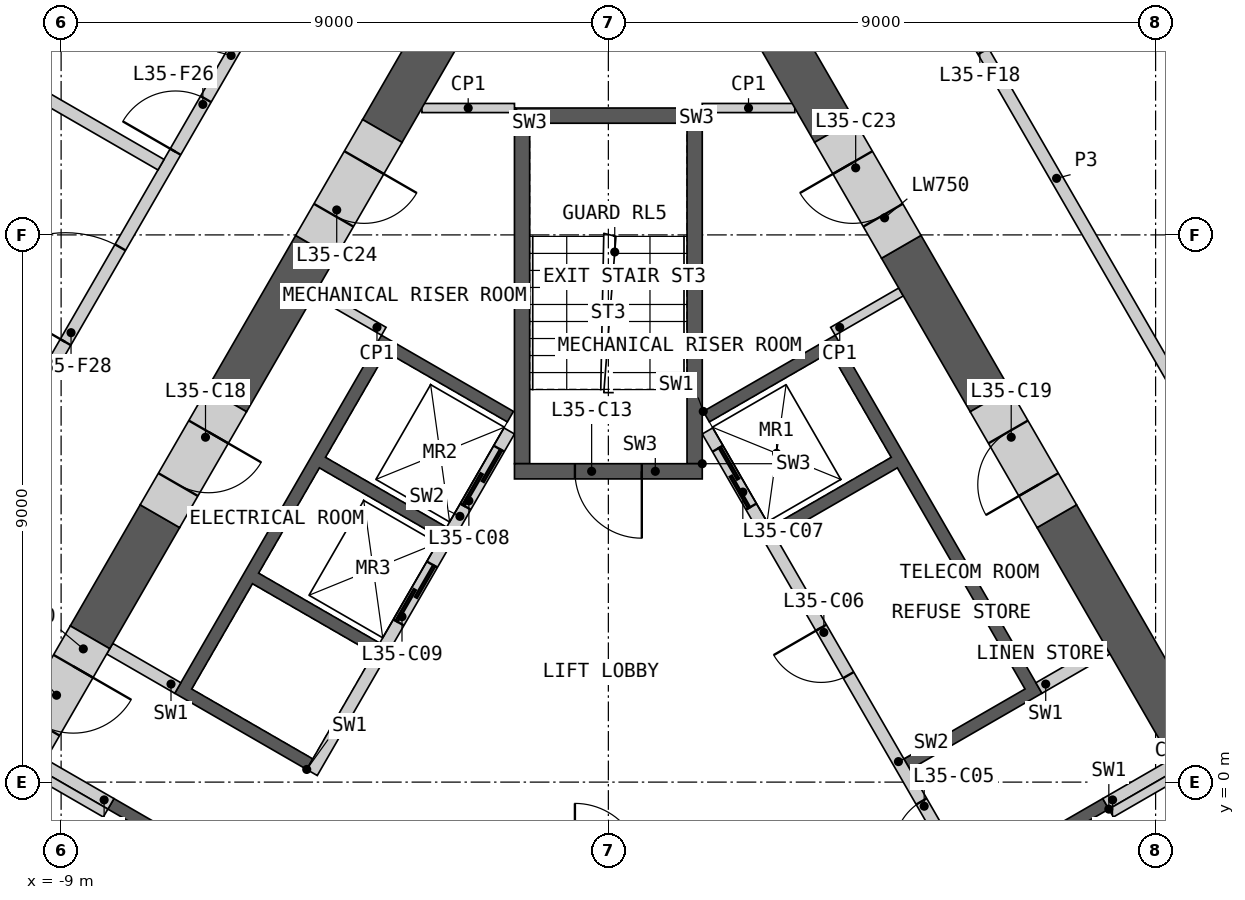
"""IFC4 building model, lengths in metres.
Left out: names, types, materials, properties, quantities, classifications, styles, units other than length and angle.
Written with IfcOpenShell. Run it as: python <this file> out.ifc"""

import sys

from ifc_helpers import new_model, si_unit, direction, frame, frame_2d, origin, place, context, subcontext, project, spatial, polyline, rectangle, outline, extrude, element, fill, save


model = new_model("IFC4")
c1 = context("Model", 3, precision=1e-05, world=origin(), true_north=direction((0.0, 1.0)))
c2 = subcontext(c1, "Body", "Model", "MODEL_VIEW")
j1 = project(units=[si_unit("LENGTHUNIT", "METRE"), si_unit("PLANEANGLEUNIT", "RADIAN")], contexts=[c1])
p1 = place(None, origin())
s1 = spatial("IfcSite", under=j1, at=p1, CompositionType="ELEMENT")
p2 = place(p1, origin())
s2 = spatial("IfcBuilding", under=s1, at=p2, CompositionType="ELEMENT")
p3 = place(p2, frame((0.0, 0.0, 169.2)))
s3 = spatial("IfcBuildingStorey", under=s2, at=p3, CompositionType="ELEMENT", Elevation=169.2)
p4 = place(p3, origin())
e1 = element("IfcWall", 1, at=p4, inside=s3, PredefinedType="SHEAR", context=c2, shape_type="SweptSolid", body=[
    extrude(outline(polyline([(1.561, 6.097), (3.731, 7.35), (7.131, 1.461), (4.96, 0.208), (4.861, 0.381), (6.852, 1.531), (4.752, 5.169), (2.76, 4.019), (2.66, 4.192), (4.652, 5.342), (3.652, 7.074), (1.66, 5.924), (1.561, 6.097)])), origin(), (0.0, 0.0, 1.0), 3.25),
])
p5 = place(p3, origin())
e2 = element("IfcWall", 2, at=p5, inside=s3, PredefinedType="SHEAR", context=c2, shape_type="SweptSolid", body=[
    extrude(outline(polyline([(8.231, -0.444), (6.061, -1.697), (5.96, -1.524), (8.131, -0.271), (8.231, -0.444)])), origin(), (0.0, 0.0, 1.0), 3.25),
])
p6 = place(p3, frame((5.817, -1.476, 0.0), z_axis=(0.0, 0.0, 1.0), x_axis=(-0.500002616675, 0.866023893041, 0.0)))
e3 = element("IfcWall", 3, at=p6, inside=s3, PredefinedType="SOLIDWALL", context=c2, shape_type="SweptSolid", body=[
    extrude(rectangle(XDim=8.373, YDim=0.2, at=frame_2d((4.187, 0.0))), origin(), (0.0, 0.0, 1.0), 3.25),
])
p7 = place(p6, frame((0.437, 0.0, 0.0)))
e4 = element("IfcOpeningElement", 4, at=p7, cuts=e3, PredefinedType="OPENING", context=c2, shape_type="SweptSolid", body=[
    extrude(rectangle(XDim=0.9, YDim=2.1, at=frame_2d((0.45, 1.05))), frame((0.0, 0.11, 0.0), z_axis=(0.0, -1.0, 0.0), x_axis=(1.0, 0.0, 0.0)), (0.0, 0.0, 1.0), 0.22),
])
p8 = place(p6, frame((3.737, 0.0, 0.0)))
e5 = element("IfcOpeningElement", 5, at=p8, cuts=e3, PredefinedType="OPENING", context=c2, shape_type="SweptSolid", body=[
    extrude(rectangle(XDim=0.9, YDim=2.1, at=frame_2d((0.45, 1.05))), frame((0.0, 0.11, 0.0), z_axis=(0.0, -1.0, 0.0), x_axis=(1.0, 0.0, 0.0)), (0.0, 0.0, 1.0), 0.22),
])
p9 = place(p6, frame((6.937, 0.0, 0.0)))
e6 = element("IfcOpeningElement", 6, at=p9, cuts=e3, PredefinedType="OPENING", context=c2, shape_type="SweptSolid", body=[
    extrude(rectangle(XDim=1.1, YDim=2.1, at=frame_2d((0.55, 1.05))), frame((0.0, 0.11, 0.0), z_axis=(0.0, -1.0, 0.0), x_axis=(1.0, 0.0, 0.0)), (0.0, 0.0, 1.0), 0.22),
])
for number, where, z_axis, x_axis in (
    (7, (8.181, -0.357, 0.0), (0.0, 0.0, 1.0), (0.866, 0.5, 0.0)),
    (8, (7.081, 1.548, 0.0), (0.0, 0.0, 1.0), (0.866, 0.5, 0.0)),
):
    element("IfcWall", number, at=place(p3, frame(where, z_axis=z_axis, x_axis=x_axis)), inside=s3, PredefinedType="SHEAR", context=c2, shape_type="SweptSolid", body=[
        extrude(rectangle(XDim=1.293, YDim=0.2, at=frame_2d((0.646, 0.0))), origin(), (0.0, 0.0, 1.0), 3.25),
    ])
p10 = place(p3, origin())
e9 = element("IfcWall", 9, at=p10, inside=s3, PredefinedType="SHEAR", context=c2, shape_type="SweptSolid", body=[
    extrude(outline(polyline([(-6.061, -1.697), (-8.231, -0.444), (-8.131, -0.271), (-5.96, -1.524), (-6.061, -1.697)])), origin(), (0.0, 0.0, 1.0), 3.25),
])
p11 = place(p3, origin())
e10 = element("IfcWall", 10, at=p11, inside=s3, PredefinedType="SHEAR", context=c2, shape_type="SweptSolid", body=[
    extrude(outline(polyline([(-4.96, 0.208), (-7.131, 1.461), (-3.731, 7.35), (-1.561, 6.097), (-1.66, 5.924), (-3.652, 7.074), (-4.652, 5.342), (-2.66, 4.192), (-2.76, 4.019), (-4.752, 5.169), (-5.752, 3.437), (-3.76, 2.287), (-3.861, 2.113), (-5.852, 3.263), (-6.852, 1.531), (-4.861, 0.381), (-4.96, 0.208)])), origin(), (0.0, 0.0, 1.0), 3.25),
])
p12 = place(p3, frame((-1.631, 5.776, 0.0), z_axis=(0.0, 0.0, 1.0), x_axis=(-0.499992876559, -0.866029516466, 0.0)))
e11 = element("IfcWall", 11, at=p12, inside=s3, PredefinedType="SOLIDWALL", context=c2, shape_type="SweptSolid", body=[
    extrude(rectangle(XDim=6.486, YDim=0.2, at=frame_2d((3.243, 0.0))), origin(), (0.0, 0.0, 1.0), 3.25),
])
p13 = place(p12, frame((0.337, 0.0, 0.0)))
e12 = element("IfcOpeningElement", 12, at=p13, cuts=e11, PredefinedType="OPENING", context=c2, shape_type="SweptSolid", body=[
    extrude(rectangle(XDim=1.1, YDim=2.1, at=frame_2d((0.55, 1.05))), frame((0.0, 0.11, 0.0), z_axis=(0.0, -1.0, 0.0), x_axis=(1.0, 0.0, 0.0)), (0.0, 0.0, 1.0), 0.22),
])
p14 = place(p12, frame((2.537, 0.0, 0.0)))
e13 = element("IfcOpeningElement", 13, at=p14, cuts=e11, PredefinedType="OPENING", context=c2, shape_type="SweptSolid", body=[
    extrude(rectangle(XDim=1.1, YDim=2.1, at=frame_2d((0.55, 1.05))), frame((0.0, 0.11, 0.0), z_axis=(0.0, -1.0, 0.0), x_axis=(1.0, 0.0, 0.0)), (0.0, 0.0, 1.0), 0.22),
])
for number, where, z_axis, x_axis in (
    (14, (-7.081, 1.548, 0.0), (0.0, 0.0, 1.0), (-0.866, 0.5, 0.0)),
    (15, (-8.181, -0.357, 0.0), (0.0, 0.0, 1.0), (-0.866, 0.5, 0.0)),
):
    element("IfcWall", number, at=place(p3, frame(where, z_axis=z_axis, x_axis=x_axis)), inside=s3, PredefinedType="SHEAR", context=c2, shape_type="SweptSolid", body=[
        extrude(rectangle(XDim=1.293, YDim=0.2, at=frame_2d((0.646, 0.0))), origin(), (0.0, 0.0, 1.0), 3.25),
    ])
p15 = place(p3, origin())
e16 = element("IfcWall", 16, at=p15, inside=s3, PredefinedType="SHEAR", context=c2, shape_type="SweptSolid", body=[
    extrude(outline(polyline([(1.544, 5.237), (1.544, 11.087), (1.294, 10.837), (1.294, 5.237), (1.544, 5.237)])), origin(), (0.0, 0.0, 1.0), 3.25),
])
p16 = place(p3, origin())
e17 = element("IfcWall", 17, at=p16, inside=s3, PredefinedType="SHEAR", context=c2, shape_type="SweptSolid", body=[
    extrude(outline(polyline([(1.544, 11.087), (-1.544, 11.087), (-1.294, 10.837), (1.294, 10.837), (1.544, 11.087)])), origin(), (0.0, 0.0, 1.0), 3.25),
])
p17 = place(p3, origin())
e18 = element("IfcWall", 18, at=p17, inside=s3, PredefinedType="SHEAR", context=c2, shape_type="SweptSolid", body=[
    extrude(outline(polyline([(-1.294, 10.837), (-1.544, 11.087), (-1.544, 5.237), (-1.294, 5.237), (-1.294, 10.837)])), origin(), (0.0, 0.0, 1.0), 3.25),
])
p18 = place(p3, frame((1.544, 5.112, 0.0), z_axis=(0.0, 0.0, 1.0), x_axis=(-1.0, 0.0, 0.0)))
e19 = element("IfcWall", 19, at=p18, inside=s3, PredefinedType="SHEAR", context=c2, shape_type="SweptSolid", body=[
    extrude(rectangle(XDim=3.088, YDim=0.25, at=frame_2d((1.544, 0.0))), origin(), (0.0, 0.0, 1.0), 3.25),
])
p19 = place(p18, frame((0.994, 0.0, 0.0)))
e20 = element("IfcOpeningElement", 20, at=p19, cuts=e19, PredefinedType="OPENING", context=c2, shape_type="SweptSolid", body=[
    extrude(rectangle(XDim=1.1, YDim=2.1, at=frame_2d((0.55, 1.05))), frame((0.0, 0.135, 0.0), z_axis=(0.0, -1.0, 0.0), x_axis=(1.0, 0.0, 0.0)), (0.0, 0.0, 1.0), 0.27),
])
for number, where, z_axis, x_axis in (
    (21, (3.693, 7.415, 0.0), (0.0, 0.0, 1.0), (0.866, 0.5, 0.0)),
    (22, (8.268, -0.509, 0.0), (0.0, 0.0, 1.0), (0.866, 0.5, 0.0)),
    (23, (-8.268, -0.509, 0.0), (0.0, 0.0, 1.0), (-0.866, 0.5, 0.0)),
    (24, (-3.693, 7.415, 0.0), (0.0, 0.0, 1.0), (-0.866, 0.5, 0.0)),
):
    element("IfcWall", number, at=place(p3, frame(where, z_axis=z_axis, x_axis=x_axis)), inside=s3, PredefinedType="PARTITIONING", context=c2, shape_type="SweptSolid", body=[
        extrude(rectangle(XDim=1.293, YDim=0.15, at=frame_2d((0.646, 0.0))), origin(), (0.0, 0.0, 1.0), 3.25),
    ])
for number, where, z_axis, x_axis in (
    (25, (1.544, 11.087, 0.0), (0.0, 0.0, 1.0), (1.0, 0.0, 0.0)),
    (26, (-1.544, 11.087, 0.0), (0.0, 0.0, 1.0), (-1.0, 0.0, 0.0)),
):
    element("IfcWall", number, at=place(p3, frame(where, z_axis=z_axis, x_axis=x_axis)), inside=s3, PredefinedType="PARTITIONING", context=c2, shape_type="SweptSolid", body=[
        extrude(rectangle(XDim=1.522, YDim=0.15, at=frame_2d((0.761, 0.0))), origin(), (0.0, 0.0, 1.0), 3.25),
    ])
p20 = place(p3, frame((14.526, -8.011, 0.0), z_axis=(0.0, 0.0, 1.0), x_axis=(-0.499994855372, 0.866028374016, 0.0)))
e27 = element("IfcWall", 27, at=p20, inside=s3, PredefinedType="SHEAR", context=c2, shape_type="SweptSolid", body=[
    extrude(rectangle(XDim=14.301, YDim=0.75, at=frame_2d((7.15, 0.0))), origin(), (0.0, 0.0, 1.0), 3.25),
])
p21 = place(p3, frame((6.275, 6.279, 0.0), z_axis=(0.0, 0.0, 1.0), x_axis=(-0.500029273391, 0.866008502124, 0.0)))
e28 = element("IfcWall", 28, at=p21, inside=s3, PredefinedType="SHEAR", context=c2, shape_type="SweptSolid", body=[
    extrude(rectangle(XDim=2.916, YDim=0.75, at=frame_2d((1.458, 0.0))), origin(), (0.0, 0.0, 1.0), 3.25),
])
p22 = place(p3, frame((3.717, 10.709, 0.0), z_axis=(0.0, 0.0, 1.0), x_axis=(-0.500005599468, 0.866022170906, 0.0)))
e29 = element("IfcWall", 29, at=p22, inside=s3, PredefinedType="SHEAR", context=c2, shape_type="SweptSolid", body=[
    extrude(rectangle(XDim=2.662, YDim=0.75, at=frame_2d((1.331, 0.0))), origin(), (0.0, 0.0, 1.0), 3.25),
])
p23 = place(p3, frame((-0.325, 16.585, 0.0), z_axis=(0.0, 0.0, 1.0), x_axis=(-0.499993425452, -0.866029199568, 0.0)))
e30 = element("IfcWall", 30, at=p23, inside=s3, PredefinedType="SHEAR", context=c2, shape_type="SweptSolid", body=[
    extrude(rectangle(XDim=6.785, YDim=0.75, at=frame_2d((3.393, 0.0))), origin(), (0.0, 0.0, 1.0), 3.25),
])
p24 = place(p3, frame((-4.817, 8.804, 0.0), z_axis=(0.0, 0.0, 1.0), x_axis=(-0.500029273391, -0.866008502124, 0.0)))
e31 = element("IfcWall", 31, at=p24, inside=s3, PredefinedType="SHEAR", context=c2, shape_type="SweptSolid", body=[
    extrude(rectangle(XDim=2.916, YDim=0.75, at=frame_2d((1.458, 0.0))), origin(), (0.0, 0.0, 1.0), 3.25),
])
p25 = place(p3, frame((-7.375, 4.374, 0.0), z_axis=(0.0, 0.0, 1.0), x_axis=(-0.499952165731, -0.866053019151, 0.0)))
e32 = element("IfcWall", 32, at=p25, inside=s3, PredefinedType="SHEAR", context=c2, shape_type="SweptSolid", body=[
    extrude(rectangle(XDim=2.3, YDim=0.75, at=frame_2d((1.15, 0.0))), origin(), (0.0, 0.0, 1.0), 3.25),
])
p26 = place(p3, frame((-6.275, 6.279, 0.0), z_axis=(0.0, 0.0, 1.0), x_axis=(-0.499946605688, -0.86605622881, 0.0)))
e33 = element("IfcWall", 33, at=p26, inside=s3, PredefinedType="SHEAR", context=c2, shape_type="SweptSolid", body=[
    extrude(rectangle(XDim=2.2, YDim=0.75, at=frame_2d((1.1, 0.0))), origin(), (0.0, 0.0, 1.0), 3.25),
])
p27 = place(p26, frame((0.6, 0.0, 0.0)))
e34 = element("IfcOpeningElement", 34, at=p27, cuts=e33, PredefinedType="OPENING", context=c2, shape_type="SweptSolid", body=[
    extrude(rectangle(XDim=1.0, YDim=2.1, at=frame_2d((0.5, 1.05))), frame((0.0, 0.385, 0.0), z_axis=(0.0, -1.0, 0.0), x_axis=(1.0, 0.0, 0.0)), (0.0, 0.0, 1.0), 0.77),
])
p28 = place(p3, frame((7.375, 4.374, 0.0), z_axis=(0.0, 0.0, 1.0), x_axis=(-0.499946605688, 0.86605622881, 0.0)))
e35 = element("IfcWall", 35, at=p28, inside=s3, PredefinedType="SHEAR", context=c2, shape_type="SweptSolid", body=[
    extrude(rectangle(XDim=2.2, YDim=0.75, at=frame_2d((1.1, 0.0))), origin(), (0.0, 0.0, 1.0), 3.25),
])
p29 = place(p28, frame((0.6, 0.0, 0.0)))
e36 = element("IfcOpeningElement", 36, at=p29, cuts=e35, PredefinedType="OPENING", context=c2, shape_type="SweptSolid", body=[
    extrude(rectangle(XDim=1.0, YDim=2.1, at=frame_2d((0.5, 1.05))), frame((0.0, 0.385, 0.0), z_axis=(0.0, -1.0, 0.0), x_axis=(1.0, 0.0, 0.0)), (0.0, 0.0, 1.0), 0.77),
])
p30 = place(p3, frame((4.817, 8.804, 0.0), z_axis=(0.0, 0.0, 1.0), x_axis=(-0.50002983664, 0.866008176907, 0.0)))
e37 = element("IfcWall", 37, at=p30, inside=s3, PredefinedType="SHEAR", context=c2, shape_type="SweptSolid", body=[
    extrude(rectangle(XDim=2.2, YDim=0.75, at=frame_2d((1.1, 0.0))), origin(), (0.0, 0.0, 1.0), 3.25),
])
p31 = place(p30, frame((0.6, 0.0, 0.0)))
e38 = element("IfcOpeningElement", 38, at=p31, cuts=e37, PredefinedType="OPENING", context=c2, shape_type="SweptSolid", body=[
    extrude(rectangle(XDim=1.0, YDim=2.1, at=frame_2d((0.5, 1.05))), frame((0.0, 0.385, 0.0), z_axis=(0.0, -1.0, 0.0), x_axis=(1.0, 0.0, 0.0)), (0.0, 0.0, 1.0), 0.77),
])
p32 = place(p3, frame((-3.717, 10.709, 0.0), z_axis=(0.0, 0.0, 1.0), x_axis=(-0.50002983664, -0.866008176907, 0.0)))
e39 = element("IfcWall", 39, at=p32, inside=s3, PredefinedType="SHEAR", context=c2, shape_type="SweptSolid", body=[
    extrude(rectangle(XDim=2.2, YDim=0.75, at=frame_2d((1.1, 0.0))), origin(), (0.0, 0.0, 1.0), 3.25),
])
p33 = place(p32, frame((0.6, 0.0, 0.0)))
e40 = element("IfcOpeningElement", 40, at=p33, cuts=e39, PredefinedType="OPENING", context=c2, shape_type="SweptSolid", body=[
    extrude(rectangle(XDim=1.0, YDim=2.1, at=frame_2d((0.5, 1.05))), frame((0.0, 0.385, 0.0), z_axis=(0.0, -1.0, 0.0), x_axis=(1.0, 0.0, 0.0)), (0.0, 0.0, 1.0), 0.77),
])
p34 = place(p3, frame((-8.525, 2.382, 0.0), z_axis=(0.0, 0.0, 1.0), x_axis=(-0.500077893725, -0.86598042715, 0.0)))
e41 = element("IfcWall", 41, at=p34, inside=s3, PredefinedType="SHEAR", context=c2, shape_type="SweptSolid", body=[
    extrude(rectangle(XDim=2.2, YDim=0.75, at=frame_2d((1.1, 0.0))), origin(), (0.0, 0.0, 1.0), 3.25),
])
p35 = place(p34, frame((0.55, 0.0, 0.0)))
e42 = element("IfcOpeningElement", 42, at=p35, cuts=e41, PredefinedType="OPENING", context=c2, shape_type="SweptSolid", body=[
    extrude(rectangle(XDim=1.1, YDim=2.1, at=frame_2d((0.55, 1.05))), frame((0.0, 0.385, 0.0), z_axis=(0.0, -1.0, 0.0), x_axis=(1.0, 0.0, 0.0)), (0.0, 0.0, 1.0), 0.77),
])
p36 = place(p3, frame((5.038, 13.972, 0.0), z_axis=(0.0, 0.0, 1.0), x_axis=(0.50000393355, -0.866023132736, 0.0)))
e43 = element("IfcWall", 43, at=p36, inside=s3, PredefinedType="PARTITIONING", context=c2, shape_type="SweptSolid", body=[
    extrude(rectangle(XDim=9.335, YDim=0.2, at=frame_2d((4.667, 0.0))), origin(), (0.0, 0.0, 1.0), 3.25),
])
p37 = place(p36, frame((1.154, 0.0, 0.0)))
e44 = element("IfcOpeningElement", 44, at=p37, cuts=e43, PredefinedType="OPENING", context=c2, shape_type="SweptSolid", body=[
    extrude(rectangle(XDim=1.1, YDim=2.1, at=frame_2d((0.55, 1.05))), frame((0.0, 0.11, 0.0), z_axis=(0.0, -1.0, 0.0), x_axis=(1.0, 0.0, 0.0)), (0.0, 0.0, 1.0), 0.22),
])
p38 = place(p3, frame((-9.705, 5.888, 0.0), z_axis=(0.0, 0.0, 1.0), x_axis=(0.50000393355, 0.866023132736, 0.0)))
e45 = element("IfcWall", 45, at=p38, inside=s3, PredefinedType="PARTITIONING", context=c2, shape_type="SweptSolid", body=[
    extrude(rectangle(XDim=9.335, YDim=0.2, at=frame_2d((4.667, 0.0))), origin(), (0.0, 0.0, 1.0), 3.25),
])
p39 = place(p38, frame((5.172, 0.0, 0.0)))
e46 = element("IfcOpeningElement", 46, at=p39, cuts=e45, PredefinedType="OPENING", context=c2, shape_type="SweptSolid", body=[
    extrude(rectangle(XDim=1.0, YDim=2.1, at=frame_2d((0.5, 1.05))), frame((0.0, 0.11, 0.0), z_axis=(0.0, -1.0, 0.0), x_axis=(1.0, 0.0, 0.0)), (0.0, 0.0, 1.0), 0.22),
])
p40 = place(p38, frame((1.556, 0.0, 0.0)))
e47 = element("IfcOpeningElement", 47, at=p40, cuts=e45, PredefinedType="OPENING", context=c2, shape_type="SweptSolid", body=[
    extrude(rectangle(XDim=1.8, YDim=2.1, at=frame_2d((0.9, 1.05))), frame((0.0, 0.11, 0.0), z_axis=(0.0, -1.0, 0.0), x_axis=(1.0, 0.0, 0.0)), (0.0, 0.0, 1.0), 0.22),
])
p41 = place(p3, frame((-14.39, 14.215, 0.0), z_axis=(0.0, 0.0, 1.0), x_axis=(0.86602738064, -0.499996575971, 0.0)))
e48 = element("IfcWall", 48, at=p41, inside=s3, PredefinedType="PARTITIONING", context=c2, shape_type="SweptSolid", body=[
    extrude(rectangle(XDim=8.121, YDim=0.2, at=frame_2d((4.06, 0.0))), origin(), (0.0, 0.0, 1.0), 2.404),
])
p42 = place(p7, origin())
e49 = element("IfcDoor", 49, at=p42, inside=s3, OperationType="SINGLE_SWING_LEFT", PredefinedType="DOOR", context=c2, shape_type="SweptSolid", body=[
    extrude(rectangle(XDim=0.9, YDim=2.1, at=frame_2d((0.45, 1.05))), frame((0.0, 0.025, 0.0), z_axis=(0.0, -1.0, 0.0), x_axis=(1.0, 0.0, 0.0)), (0.0, 0.0, 1.0), 0.05),
])
fill(e4, e49)
p43 = place(p8, origin())
e50 = element("IfcDoor", 50, at=p43, inside=s3, OperationType="SINGLE_SWING_RIGHT", PredefinedType="DOOR", context=c2, shape_type="SweptSolid", body=[
    extrude(rectangle(XDim=0.9, YDim=2.1, at=frame_2d((0.45, 1.05))), frame((0.0, 0.025, 0.0), z_axis=(0.0, -1.0, 0.0), x_axis=(1.0, 0.0, 0.0)), (0.0, 0.0, 1.0), 0.05),
])
fill(e5, e50)
p44 = place(p9, origin())
e51 = element("IfcDoor", 51, at=p44, inside=s3, OperationType="SLIDING_TO_LEFT", PredefinedType="DOOR", context=c2, shape_type="SweptSolid", body=[
    extrude(rectangle(XDim=1.1, YDim=2.1, at=frame_2d((0.55, 1.05))), frame((0.0, 0.025, 0.0), z_axis=(0.0, -1.0, 0.0), x_axis=(1.0, 0.0, 0.0)), (0.0, 0.0, 1.0), 0.05),
])
fill(e6, e51)
p45 = place(p13, origin())
e52 = element("IfcDoor", 52, at=p45, inside=s3, OperationType="SLIDING_TO_LEFT", PredefinedType="DOOR", context=c2, shape_type="SweptSolid", body=[
    extrude(rectangle(XDim=1.1, YDim=2.1, at=frame_2d((0.55, 1.05))), frame((0.0, 0.025, 0.0), z_axis=(0.0, -1.0, 0.0), x_axis=(1.0, 0.0, 0.0)), (0.0, 0.0, 1.0), 0.05),
])
fill(e12, e52)
p46 = place(p14, origin())
e53 = element("IfcDoor", 53, at=p46, inside=s3, OperationType="SLIDING_TO_LEFT", PredefinedType="DOOR", context=c2, shape_type="SweptSolid", body=[
    extrude(rectangle(XDim=1.1, YDim=2.1, at=frame_2d((0.55, 1.05))), frame((0.0, 0.025, 0.0), z_axis=(0.0, -1.0, 0.0), x_axis=(1.0, 0.0, 0.0)), (0.0, 0.0, 1.0), 0.05),
])
fill(e13, e53)
p47 = place(p19, origin())
e54 = element("IfcDoor", 54, at=p47, inside=s3, OperationType="SINGLE_SWING_LEFT", PredefinedType="DOOR", context=c2, shape_type="SweptSolid", body=[
    extrude(rectangle(XDim=1.1, YDim=2.1, at=frame_2d((0.55, 1.05))), frame((0.0, 0.025, 0.0), z_axis=(0.0, -1.0, 0.0), x_axis=(1.0, 0.0, 0.0)), (0.0, 0.0, 1.0), 0.05),
])
fill(e20, e54)
p48 = place(p27, origin())
e55 = element("IfcDoor", 55, at=p48, inside=s3, OperationType="SINGLE_SWING_LEFT", PredefinedType="DOOR", context=c2, shape_type="SweptSolid", body=[
    extrude(rectangle(XDim=1.0, YDim=2.1, at=frame_2d((0.5, 1.05))), frame((0.0, 0.13, 0.0), z_axis=(0.0, -1.0, 0.0), x_axis=(1.0, 0.0, 0.0)), (0.0, 0.0, 1.0), 0.05),
])
fill(e34, e55)
p49 = place(p29, origin())
e56 = element("IfcDoor", 56, at=p49, inside=s3, OperationType="SINGLE_SWING_LEFT", PredefinedType="DOOR", context=c2, shape_type="SweptSolid", body=[
    extrude(rectangle(XDim=1.0, YDim=2.1, at=frame_2d((0.5, 1.05))), frame((0.0, 0.13, 0.0), z_axis=(0.0, -1.0, 0.0), x_axis=(1.0, 0.0, 0.0)), (0.0, 0.0, 1.0), 0.05),
])
fill(e36, e56)
p50 = place(p31, origin())
e57 = element("IfcDoor", 57, at=p50, inside=s3, OperationType="SINGLE_SWING_RIGHT", PredefinedType="DOOR", context=c2, shape_type="SweptSolid", body=[
    extrude(rectangle(XDim=1.0, YDim=2.1, at=frame_2d((0.5, 1.05))), frame((0.0, 0.13, 0.0), z_axis=(0.0, -1.0, 0.0), x_axis=(1.0, 0.0, 0.0)), (0.0, 0.0, 1.0), 0.05),
])
fill(e38, e57)
p51 = place(p33, origin())
e58 = element("IfcDoor", 58, at=p51, inside=s3, OperationType="SINGLE_SWING_LEFT", PredefinedType="DOOR", context=c2, shape_type="SweptSolid", body=[
    extrude(rectangle(XDim=1.0, YDim=2.1, at=frame_2d((0.5, 1.05))), frame((0.0, 0.13, 0.0), z_axis=(0.0, -1.0, 0.0), x_axis=(1.0, 0.0, 0.0)), (0.0, 0.0, 1.0), 0.05),
])
fill(e40, e58)
p52 = place(p35, origin())
e59 = element("IfcDoor", 59, at=p52, inside=s3, OperationType="SINGLE_SWING_LEFT", PredefinedType="DOOR", context=c2, shape_type="SweptSolid", body=[
    extrude(rectangle(XDim=1.1, YDim=2.1, at=frame_2d((0.55, 1.05))), frame((0.0, 0.13, 0.0), z_axis=(0.0, -1.0, 0.0), x_axis=(1.0, 0.0, 0.0)), (0.0, 0.0, 1.0), 0.05),
])
fill(e42, e59)
p53 = place(p37, origin())
e60 = element("IfcDoor", 60, at=p53, inside=s3, OperationType="SINGLE_SWING_RIGHT", PredefinedType="DOOR", context=c2, shape_type="SweptSolid", body=[
    extrude(rectangle(XDim=1.1, YDim=2.1, at=frame_2d((0.55, 1.05))), frame((0.0, 0.025, 0.0), z_axis=(0.0, -1.0, 0.0), x_axis=(1.0, 0.0, 0.0)), (0.0, 0.0, 1.0), 0.05),
])
fill(e44, e60)
p54 = place(p39, origin())
e61 = element("IfcDoor", 61, at=p54, inside=s3, OperationType="SINGLE_SWING_LEFT", PredefinedType="DOOR", context=c2, shape_type="SweptSolid", body=[
    extrude(rectangle(XDim=1.0, YDim=2.1, at=frame_2d((0.5, 1.05))), frame((0.0, 0.025, 0.0), z_axis=(0.0, -1.0, 0.0), x_axis=(1.0, 0.0, 0.0)), (0.0, 0.0, 1.0), 0.05),
])
fill(e46, e61)
p55 = place(p40, origin())
e62 = element("IfcDoor", 62, at=p55, inside=s3, OperationType="DOUBLE_DOOR_SINGLE_SWING", PredefinedType="DOOR", context=c2, shape_type="SweptSolid", body=[
    extrude(rectangle(XDim=1.8, YDim=2.1, at=frame_2d((0.9, 1.05))), frame((0.0, 0.025, 0.0), z_axis=(0.0, -1.0, 0.0), x_axis=(1.0, 0.0, 0.0)), (0.0, 0.0, 1.0), 0.05),
])
fill(e47, e62)
save(model, sys.argv[1])
